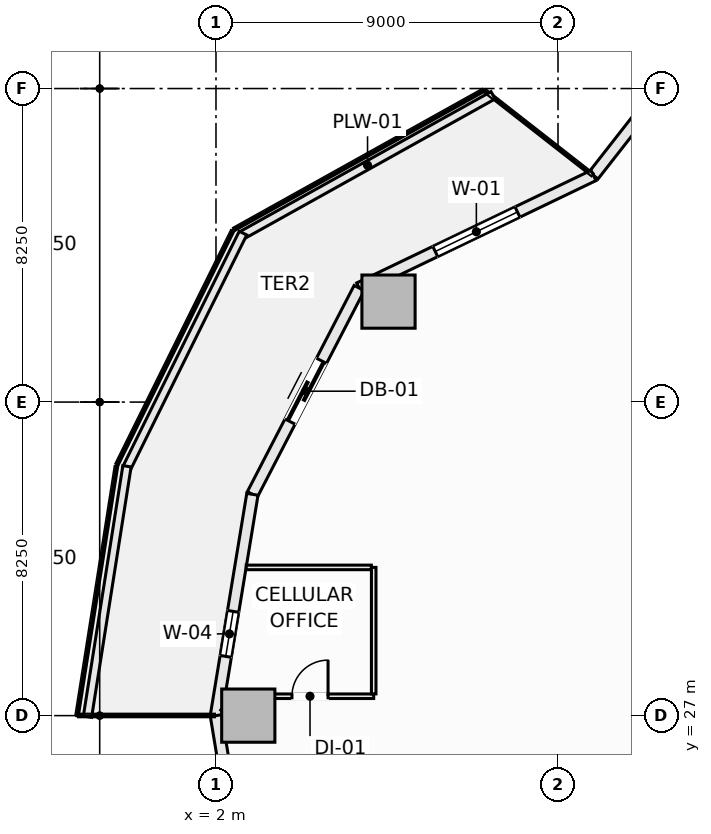
"""IFC4 building model, lengths in metres.
Left out: names, types, materials, properties, quantities, classifications, styles, units other than length and angle.
Written with IfcOpenShell. Run it as: python <this file> out.ifc"""

import sys

from ifc_helpers import new_model, si_unit, direction, frame, frame_2d, origin, origin_2d, place, context, subcontext, project, spatial, rectangle, extrude, element, fill, save


model = new_model("IFC4")
c1 = context("Model", 3, precision=1e-05, world=origin(), true_north=direction((0.0, 1.0)))
c2 = subcontext(c1, "Body", "Model", "MODEL_VIEW")
j1 = project(units=[si_unit("LENGTHUNIT", "METRE"), si_unit("PLANEANGLEUNIT", "RADIAN")], contexts=[c1])
p1 = place(None, origin())
s1 = spatial("IfcSite", under=j1, at=p1, CompositionType="ELEMENT")
p2 = place(p1, origin())
s2 = spatial("IfcBuilding", under=s1, at=p2, CompositionType="ELEMENT")
p3 = place(p2, frame((0.0, 0.0, 26.5)))
s3 = spatial("IfcBuildingStorey", under=s2, at=p3, CompositionType="ELEMENT", Elevation=26.5)
for number, where, z_axis, x_axis in (
    (1, (6.54, 37.894, -0.28), (0.0, 0.0, 1.0), (1.0, 0.0, 0.0)),
    (2, (2.85, 27.0, -0.28), (0.0, 0.0, 1.0), (1.0, 0.0, 0.0)),
):
    element("IfcColumn", number, at=place(p3, frame(where, z_axis=z_axis, x_axis=x_axis)), inside=s3, PredefinedType="COLUMN", context=c2, shape_type="SweptSolid", body=[
        extrude(rectangle(XDim=1.4, YDim=1.4, at=origin_2d()), origin(), (0.0, 0.0, 1.0), 3.85),
    ])
p4 = place(p3, frame((11.935, 41.213, 0.0), z_axis=(0.0, 0.0, 1.0), x_axis=(0.616421309777, 0.787416515482, 0.0)))
e3 = element("IfcWall", 3, at=p4, inside=s3, PredefinedType="SOLIDWALL", context=c2, shape_type="SweptSolid", body=[
    extrude(rectangle(XDim=6.696, YDim=0.3, at=frame_2d((3.348, 0.0))), origin(), (0.0, 0.0, 1.0), 3.093),
])
p5 = place(p4, frame((2.148, 0.0, 0.85)))
e4 = element("IfcOpeningElement", 4, at=p5, cuts=e3, PredefinedType="OPENING", context=c2, shape_type="SweptSolid", body=[
    extrude(rectangle(XDim=2.4, YDim=1.9, at=frame_2d((1.2, 0.95))), frame((0.0, 0.16, 0.0), z_axis=(0.0, -1.0, 0.0), x_axis=(1.0, 0.0, 0.0)), (0.0, 0.0, 1.0), 0.32),
])
p6 = place(p3, frame((5.768, 38.25, 0.0), z_axis=(0.0, 0.0, 1.0), x_axis=(0.901360393999, 0.433069786673, 0.0)))
e5 = element("IfcWall", 5, at=p6, inside=s3, PredefinedType="SOLIDWALL", context=c2, shape_type="SweptSolid", body=[
    extrude(rectangle(XDim=6.842, YDim=0.3, at=frame_2d((3.421, 0.0))), origin(), (0.0, 0.0, 1.0), 3.093),
])
p7 = place(p6, frame((2.221, 0.0, 0.85)))
e6 = element("IfcOpeningElement", 6, at=p7, cuts=e5, PredefinedType="OPENING", context=c2, shape_type="SweptSolid", body=[
    extrude(rectangle(XDim=2.4, YDim=1.9, at=frame_2d((1.2, 0.95))), frame((0.0, 0.16, 0.0), z_axis=(0.0, -1.0, 0.0), x_axis=(1.0, 0.0, 0.0)), (0.0, 0.0, 1.0), 0.32),
])
p8 = place(p3, frame((2.958, 32.823, 0.0), z_axis=(0.0, 0.0, 1.0), x_axis=(0.459809804413, 0.88801742312, 0.0)))
e7 = element("IfcWall", 7, at=p8, inside=s3, PredefinedType="SOLIDWALL", context=c2, shape_type="SweptSolid", body=[
    extrude(rectangle(XDim=6.111, YDim=0.3, at=frame_2d((3.055, 0.0))), origin(), (0.0, 0.0, 1.0), 3.093),
])
p9 = place(p8, frame((2.155, 0.0, 0.0)))
e8 = element("IfcOpeningElement", 8, at=p9, cuts=e7, PredefinedType="OPENING", context=c2, shape_type="SweptSolid", body=[
    extrude(rectangle(XDim=1.8, YDim=2.25, at=frame_2d((0.9, 1.125))), frame((0.0, 0.16, 0.0), z_axis=(0.0, -1.0, 0.0), x_axis=(1.0, 0.0, 0.0)), (0.0, 0.0, 1.0), 0.32),
])
p10 = place(p3, frame((2.0, 27.0, 0.0), z_axis=(0.0, 0.0, 1.0), x_axis=(0.162366057843, 0.98673059305, 0.0)))
e9 = element("IfcWall", 9, at=p10, inside=s3, PredefinedType="SOLIDWALL", context=c2, shape_type="SweptSolid", body=[
    extrude(rectangle(XDim=5.902, YDim=0.3, at=frame_2d((2.951, 0.0))), origin(), (0.0, 0.0, 1.0), 3.093),
])
p11 = place(p10, frame((1.58, 0.0, 0.72)))
e10 = element("IfcOpeningElement", 10, at=p11, cuts=e9, PredefinedType="OPENING", context=c2, shape_type="SweptSolid", body=[
    extrude(rectangle(XDim=1.2, YDim=1.65, at=frame_2d((0.6, 0.825))), frame((0.0, 0.16, 0.0), z_axis=(0.0, -1.0, 0.0), x_axis=(1.0, 0.0, 0.0)), (0.0, 0.0, 1.0), 0.32),
])
p12 = place(p3, frame((2.0, 27.0, 0.0), z_axis=(0.0, 0.0, 1.0), x_axis=(0.162366057843, -0.98673059305, 0.0)))
e11 = element("IfcWall", 11, at=p12, inside=s3, PredefinedType="SOLIDWALL", context=c2, shape_type="SweptSolid", body=[
    extrude(rectangle(XDim=5.902, YDim=0.3, at=frame_2d((2.951, 0.0))), origin(), (0.0, 0.0, 1.0), 3.093),
])
p13 = place(p12, frame((1.751, 0.0, 0.85)))
e12 = element("IfcOpeningElement", 12, at=p13, cuts=e11, PredefinedType="OPENING", context=c2, shape_type="SweptSolid", body=[
    extrude(rectangle(XDim=2.4, YDim=1.9, at=frame_2d((1.2, 0.95))), frame((0.0, 0.16, 0.0), z_axis=(0.0, -1.0, 0.0), x_axis=(1.0, 0.0, 0.0)), (0.0, 0.0, 1.0), 0.32),
])
p14 = place(p3, frame((2.685, 39.641, 0.0), z_axis=(0.0, 0.0, 1.0), x_axis=(0.873500119739, 0.48682393205, 0.0)))
e13 = element("IfcWall", 13, at=p14, inside=s3, PredefinedType="PARAPET", context=c2, shape_type="SweptSolid", body=[
    extrude(rectangle(XDim=7.562, YDim=0.22, at=frame_2d((3.781, 0.0))), origin(), (0.0, 0.0, 1.0), 0.52),
])
p15 = place(p3, frame((-0.354, 33.502, 0.0), z_axis=(0.0, 0.0, 1.0), x_axis=(0.443578479433, 0.8962355341, 0.0)))
e14 = element("IfcWall", 14, at=p15, inside=s3, PredefinedType="PARAPET", context=c2, shape_type="SweptSolid", body=[
    extrude(rectangle(XDim=6.911, YDim=0.22, at=frame_2d((3.456, 0.0))), origin(), (0.0, 0.0, 1.0), 0.52),
])
p16 = place(p3, frame((-1.382, 26.971, 0.0), z_axis=(0.0, 0.0, 1.0), x_axis=(0.155842315528, 0.987781945923, 0.0)))
e15 = element("IfcWall", 15, at=p16, inside=s3, PredefinedType="PARAPET", context=c2, shape_type="SweptSolid", body=[
    extrude(rectangle(XDim=6.672, YDim=0.22, at=frame_2d((3.336, 0.0))), origin(), (0.0, 0.0, 1.0), 0.52),
])
p17 = place(p3, frame((2.238, 27.51, 0.0), z_axis=(0.0, 0.0, 1.0), x_axis=(1.0, 0.0, 0.0)))
e16 = element("IfcWall", 16, at=p17, inside=s3, PredefinedType="PARTITIONING", context=c2, shape_type="SweptSolid", body=[
    extrude(rectangle(XDim=3.912, YDim=0.12, at=frame_2d((1.956, 0.0))), origin(), (0.0, 0.0, 1.0), 3.57),
])
p18 = place(p17, frame((1.761, 0.0, 0.0)))
e17 = element("IfcOpeningElement", 17, at=p18, cuts=e16, PredefinedType="OPENING", context=c2, shape_type="SweptSolid", body=[
    extrude(rectangle(XDim=0.95, YDim=2.1, at=frame_2d((0.475, 1.05))), frame((0.0, 0.07, 0.0), z_axis=(0.0, -1.0, 0.0), x_axis=(1.0, 0.0, 0.0)), (0.0, 0.0, 1.0), 0.14),
])
p19 = place(p3, frame((6.15, 27.572, 0.0), z_axis=(0.0, 0.0, 1.0), x_axis=(0.0, 1.0, 0.0)))
e18 = element("IfcWall", 18, at=p19, inside=s3, PredefinedType="PARTITIONING", context=c2, shape_type="SweptSolid", body=[
    extrude(rectangle(XDim=3.328, YDim=0.12, at=frame_2d((1.664, 0.0))), origin(), (0.0, 0.0, 1.0), 3.57),
])
p20 = place(p3, frame((2.796, 30.9, 0.0), z_axis=(0.0, 0.0, 1.0), x_axis=(1.0, 0.0, 0.0)))
e19 = element("IfcWall", 19, at=p20, inside=s3, PredefinedType="PARTITIONING", context=c2, shape_type="SweptSolid", body=[
    extrude(rectangle(XDim=3.292, YDim=0.12, at=frame_2d((1.646, 0.0))), origin(), (0.0, 0.0, 1.0), 3.57),
])
p21 = place(p3, frame((2.172, 27.108, 0.0), z_axis=(0.0, 0.0, 1.0), x_axis=(0.642079819381, 0.766637792927, 0.0)))
e20 = element("IfcWall", 20, at=p21, inside=s3, PredefinedType="PARTITIONING", context=c2, shape_type="SweptSolid", body=[
    extrude(rectangle(XDim=0.443, YDim=0.12, at=frame_2d((0.221, 0.0))), origin(), (0.0, 0.0, 1.0), 3.57),
])
p22 = place(p7, origin())
e21 = element("IfcWindow", 21, at=p22, inside=s3, PartitioningType="SINGLE_PANEL", PredefinedType="WINDOW", context=c2, shape_type="SweptSolid", body=[
    extrude(rectangle(XDim=2.4, YDim=1.9, at=frame_2d((1.2, 0.95))), frame((0.0, 0.03, 0.0), z_axis=(0.0, -1.0, 0.0), x_axis=(1.0, 0.0, 0.0)), (0.0, 0.0, 1.0), 0.06),
])
fill(e6, e21)
p23 = place(p9, origin())
e22 = element("IfcDoor", 22, at=p23, inside=s3, OperationType="SLIDING_TO_LEFT", PredefinedType="DOOR", context=c2, shape_type="SweptSolid", body=[
    extrude(rectangle(XDim=1.8, YDim=2.25, at=frame_2d((0.9, 1.125))), frame((0.0, 0.025, 0.0), z_axis=(0.0, -1.0, 0.0), x_axis=(1.0, 0.0, 0.0)), (0.0, 0.0, 1.0), 0.05),
])
fill(e8, e22)
p24 = place(p11, origin())
e23 = element("IfcWindow", 23, at=p24, inside=s3, PartitioningType="SINGLE_PANEL", PredefinedType="WINDOW", context=c2, shape_type="SweptSolid", body=[
    extrude(rectangle(XDim=1.2, YDim=1.65, at=frame_2d((0.6, 0.825))), frame((0.0, 0.03, 0.0), z_axis=(0.0, -1.0, 0.0), x_axis=(1.0, 0.0, 0.0)), (0.0, 0.0, 1.0), 0.06),
])
fill(e10, e23)
p25 = place(p18, origin())
e24 = element("IfcDoor", 24, at=p25, inside=s3, OperationType="SINGLE_SWING_RIGHT", PredefinedType="DOOR", context=c2, shape_type="SweptSolid", body=[
    extrude(rectangle(XDim=0.95, YDim=2.1, at=frame_2d((0.475, 1.05))), frame((0.0, 0.025, 0.0), z_axis=(0.0, -1.0, 0.0), x_axis=(1.0, 0.0, 0.0)), (0.0, 0.0, 1.0), 0.05),
])
fill(e17, e24)
save(model, sys.argv[1])
